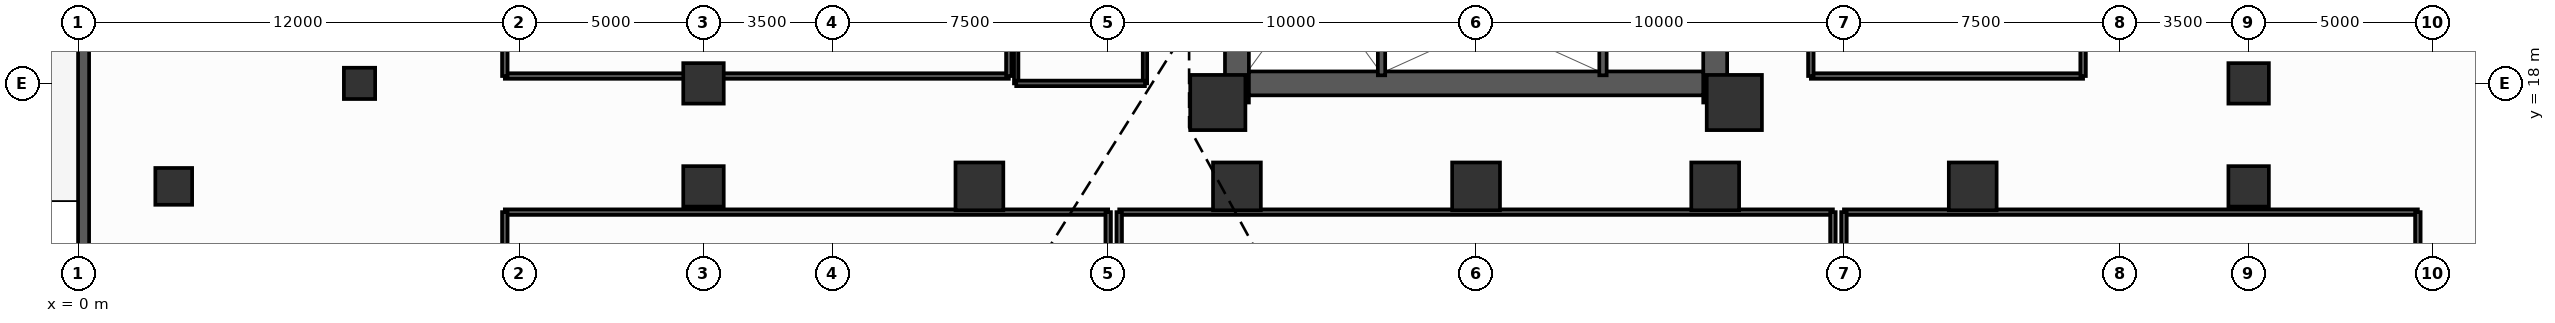
"""IFC4 building model, lengths in metres.
Left out: names, types, materials, properties, quantities, classifications, styles, units other than length and angle.
Written with IfcOpenShell. Run it as: python <this file> out.ifc"""

import sys

from ifc_helpers import new_model, si_unit, direction, frame, frame_2d, origin, origin_2d, place, context, subcontext, project, spatial, rectangle, circle, extrude, source, transform, mapped, element, fill, save


model = new_model("IFC4")
c1 = context("Model", 3, precision=1e-05, world=origin(), true_north=direction((0.0, 1.0)))
c2 = subcontext(c1, "Body", "Model", "MODEL_VIEW")
j1 = project(units=[si_unit("LENGTHUNIT", "METRE"), si_unit("PLANEANGLEUNIT", "RADIAN")], contexts=[c1])
p1 = place(None, origin())
s1 = spatial("IfcSite", under=j1, at=p1, CompositionType="ELEMENT")
p2 = place(p1, origin())
s2 = spatial("IfcBuilding", under=s1, at=p2, CompositionType="ELEMENT")
p3 = place(p2, origin())
s3 = spatial("IfcBuildingStorey", under=s2, at=p3, CompositionType="ELEMENT", Elevation=0.0)
p4 = place(p3, frame((31.5, 17.48, 0.0), z_axis=(0.0, 0.0, 1.0), x_axis=(0.0, 1.0, 0.0)))
e1 = element("IfcWall", 1, at=p4, inside=s3, PredefinedType="SHEAR", context=c2, shape_type="SweptSolid", body=[
    extrude(rectangle(XDim=19.04, YDim=0.65, at=frame_2d((9.52, 0.0))), origin(), (0.0, 0.0, 1.0), 4.2),
])
p5 = place(p4, frame((6.32, 0.0, 0.0)))
e2 = element("IfcOpeningElement", 2, at=p5, cuts=e1, PredefinedType="OPENING", context=c2, shape_type="SweptSolid", body=[
    extrude(rectangle(XDim=1.1, YDim=2.15, at=frame_2d((0.55, 1.075))), frame((0.0, 0.337, 0.0), z_axis=(0.0, -1.0, 0.0), x_axis=(1.0, 0.0, 0.0)), (0.0, 0.0, 1.0), 0.674),
])
p6 = place(p3, frame((44.5, 17.48, 0.0), z_axis=(0.0, 0.0, 1.0), x_axis=(0.0, 1.0, 0.0)))
e3 = element("IfcWall", 3, at=p6, inside=s3, PredefinedType="SHEAR", context=c2, shape_type="SweptSolid", body=[
    extrude(rectangle(XDim=19.04, YDim=0.65, at=frame_2d((9.52, 0.0))), origin(), (0.0, 0.0, 1.0), 4.2),
])
p7 = place(p6, frame((12.67, 0.0, 0.0), z_axis=(0.0, 0.0, 1.0), x_axis=(-1.0, 0.0, 0.0)))
e4 = element("IfcOpeningElement", 4, at=p7, cuts=e3, PredefinedType="OPENING", context=c2, shape_type="SweptSolid", body=[
    extrude(rectangle(XDim=1.1, YDim=2.15, at=frame_2d((0.55, 1.075))), frame((0.0, 0.337, 0.0), z_axis=(0.0, -1.0, 0.0), x_axis=(1.0, 0.0, 0.0)), (0.0, 0.0, 1.0), 0.674),
])
p8 = place(p3, frame((31.825, 18.0, 0.0), z_axis=(0.0, 0.0, 1.0), x_axis=(1.0, 0.0, 0.0)))
e5 = element("IfcWall", 5, at=p8, inside=s3, PredefinedType="SHEAR", context=c2, shape_type="SweptSolid", body=[
    extrude(rectangle(XDim=12.35, YDim=0.65, at=frame_2d((6.175, 0.0))), origin(), (0.0, 0.0, 1.0), 4.2),
])
m1 = source(origin(), c2, "Body", "SweptSolid", [
    extrude(rectangle(XDim=1.5, YDim=1.5, at=origin_2d()), origin(), (0.0, 0.0, 1.0), 4.2),
])
for number, where, z_axis, x_axis in (
    (6, (30.98, 17.48, 0.0), (0.0, 0.0, 1.0), (1.0, 0.0, 0.0)),
    (7, (45.02, 17.48, 0.0), (0.0, 0.0, 1.0), (1.0, 0.0, 0.0)),
):
    element("IfcColumn", number, at=place(p3, frame(where, z_axis=z_axis, x_axis=x_axis)), inside=s3, PredefinedType="COLUMN", context=c2, shape_type="MappedRepresentation", body=[
        mapped(m1, transform((0.0, 0.0, 0.0), scale=1.0)),
    ])
m2 = source(origin(), c2, "Body", "SweptSolid", [
    extrude(circle(Radius=0.5, at=origin_2d()), origin(), (0.0, 0.0, 1.0), 4.2),
])
p9 = place(p3, frame((2.6, 15.2, 0.0), z_axis=(0.0, 0.0, 1.0), x_axis=(1.0, 0.0, 0.0)))
e8 = element("IfcColumn", 8, at=p9, inside=s3, PredefinedType="COLUMN", context=c2, shape_type="MappedRepresentation", body=[
    mapped(m2, transform((0.0, 0.0, 0.0), scale=1.0)),
])
m3 = source(origin(), c2, "Body", "SweptSolid", [
    extrude(circle(Radius=0.425, at=origin_2d()), origin(), (0.0, 0.0, 1.0), 4.2),
])
p10 = place(p3, frame((7.65, 18.0, 0.0), z_axis=(0.0, 0.0, 1.0), x_axis=(1.0, 0.0, 0.0)))
e9 = element("IfcColumn", 9, at=p10, inside=s3, PredefinedType="COLUMN", context=c2, shape_type="MappedRepresentation", body=[
    mapped(m3, transform((0.0, 0.0, 0.0), scale=1.0)),
])
m4 = source(origin(), c2, "Body", "SweptSolid", [
    extrude(rectangle(XDim=1.1, YDim=1.1, at=origin_2d()), origin(), (0.0, 0.0, 1.0), 4.2),
])
for number, where, z_axis, x_axis in (
    (10, (17.0, 15.2, 0.0), (0.0, 0.0, 1.0), (1.0, 0.0, 0.0)),
    (11, (59.0, 15.2, 0.0), (0.0, 0.0, 1.0), (1.0, 0.0, 0.0)),
    (12, (17.0, 18.0, 0.0), (0.0, 0.0, 1.0), (1.0, 0.0, 0.0)),
    (13, (59.0, 18.0, 0.0), (0.0, 0.0, 1.0), (1.0, 0.0, 0.0)),
):
    element("IfcColumn", number, at=place(p3, frame(where, z_axis=z_axis, x_axis=x_axis)), inside=s3, PredefinedType="COLUMN", context=c2, shape_type="MappedRepresentation", body=[
        mapped(m4, transform((0.0, 0.0, 0.0), scale=1.0)),
    ])
m5 = source(origin(), c2, "Body", "SweptSolid", [
    extrude(rectangle(XDim=1.3, YDim=1.3, at=origin_2d()), origin(), (0.0, 0.0, 1.0), 4.2),
])
for number, where, z_axis, x_axis in (
    (14, (24.5, 15.2, 0.0), (0.0, 0.0, 1.0), (1.0, 0.0, 0.0)),
    (15, (31.5, 15.2, 0.0), (0.0, 0.0, 1.0), (1.0, 0.0, 0.0)),
    (16, (38.0, 15.2, 0.0), (0.0, 0.0, 1.0), (1.0, 0.0, 0.0)),
    (17, (44.5, 15.2, 0.0), (0.0, 0.0, 1.0), (1.0, 0.0, 0.0)),
    (18, (51.5, 15.2, 0.0), (0.0, 0.0, 1.0), (1.0, 0.0, 0.0)),
):
    element("IfcColumn", number, at=place(p3, frame(where, z_axis=z_axis, x_axis=x_axis)), inside=s3, PredefinedType="COLUMN", context=c2, shape_type="MappedRepresentation", body=[
        mapped(m5, transform((0.0, 0.0, 0.0), scale=1.0)),
    ])
p11 = place(p3, frame((0.15, 0.0, 0.0), z_axis=(0.0, 0.0, 1.0), x_axis=(0.0, 1.0, 0.0)))
e19 = element("IfcWall", 19, at=p11, inside=s3, PredefinedType="SOLIDWALL", context=c2, shape_type="SweptSolid", body=[
    extrude(rectangle(XDim=54.0, YDim=0.3, at=frame_2d((27.0, 0.0))), origin(), (0.0, 0.0, 1.0), 3.48),
])
p12 = place(p11, frame((10.8, 0.0, 0.0)))
e20 = element("IfcOpeningElement", 20, at=p12, cuts=e19, PredefinedType="OPENING", context=c2, shape_type="SweptSolid", body=[
    extrude(rectangle(XDim=2.4, YDim=2.4, at=frame_2d((1.2, 1.2))), frame((0.0, 0.162, 0.0), z_axis=(0.0, -1.0, 0.0), x_axis=(1.0, 0.0, 0.0)), (0.0, 0.0, 1.0), 0.324),
])
p13 = place(p3, frame((41.45, 18.22, 0.0), z_axis=(0.0, 0.0, 1.0), x_axis=(0.0, 1.0, 0.0)))
e21 = element("IfcWall", 21, at=p13, inside=s3, PredefinedType="PARTITIONING", context=c2, shape_type="SweptSolid", body=[
    extrude(rectangle(XDim=2.96, YDim=0.2, at=frame_2d((1.48, 0.0))), origin(), (0.0, 0.0, 1.0), 3.92),
])
p14 = place(p3, frame((35.43, 18.22, 0.0), z_axis=(0.0, 0.0, 1.0), x_axis=(0.0, 1.0, 0.0)))
e22 = element("IfcWall", 22, at=p14, inside=s3, PredefinedType="SOLIDWALL", context=c2, shape_type="SweptSolid", body=[
    extrude(rectangle(XDim=7.22, YDim=0.2, at=frame_2d((3.61, 0.0))), origin(), (0.0, 0.0, 1.0), 3.92),
])
p15 = place(p14, frame((6.68, 0.0, 0.0), z_axis=(0.0, 0.0, 1.0), x_axis=(-1.0, 0.0, 0.0)))
e23 = element("IfcOpeningElement", 23, at=p15, cuts=e22, PredefinedType="OPENING", context=c2, shape_type="SweptSolid", body=[
    extrude(rectangle(XDim=1.1, YDim=2.15, at=frame_2d((0.55, 1.075))), frame((0.0, 0.112, 0.0), z_axis=(0.0, -1.0, 0.0), x_axis=(1.0, 0.0, 0.0)), (0.0, 0.0, 1.0), 0.224),
])
p16 = place(p3, frame((25.5, 18.0, 0.0), z_axis=(0.0, 0.0, 1.0), x_axis=(0.0, 1.0, 0.0)))
e24 = element("IfcWall", 24, at=p16, inside=s3, PredefinedType="PARTITIONING", context=c2, shape_type="SweptSolid", body=[
    extrude(rectangle(XDim=18.0, YDim=0.12, at=frame_2d((9.0, 0.0))), origin(), (0.0, 0.0, 1.0), 3.92),
])
p17 = place(p3, frame((29.0, 18.0, 0.0), z_axis=(0.0, 0.0, 1.0), x_axis=(0.0, 1.0, 0.0)))
e25 = element("IfcWall", 25, at=p17, inside=s3, PredefinedType="PARTITIONING", context=c2, shape_type="SweptSolid", body=[
    extrude(rectangle(XDim=4.0, YDim=0.12, at=frame_2d((2.0, 0.0))), origin(), (0.0, 0.0, 1.0), 3.92),
])
p18 = place(p17, frame((1.55, 0.0, 0.0)))
e26 = element("IfcOpeningElement", 26, at=p18, cuts=e25, PredefinedType="OPENING", context=c2, shape_type="SweptSolid", body=[
    extrude(rectangle(XDim=0.9, YDim=2.1, at=frame_2d((0.45, 1.05))), frame((0.0, 0.072, 0.0), z_axis=(0.0, -1.0, 0.0), x_axis=(1.0, 0.0, 0.0)), (0.0, 0.0, 1.0), 0.144),
])
p19 = place(p3, frame((25.5, 18.0, 0.0), z_axis=(0.0, 0.0, 1.0), x_axis=(1.0, 0.0, 0.0)))
e27 = element("IfcWall", 27, at=p19, inside=s3, PredefinedType="PARTITIONING", context=c2, shape_type="SweptSolid", body=[
    extrude(rectangle(XDim=3.5, YDim=0.15, at=frame_2d((1.75, 0.0))), origin(), (0.0, 0.0, 1.0), 3.29),
])
p20 = place(p3, frame((47.1, 18.2, 0.0), z_axis=(0.0, 0.0, 1.0), x_axis=(1.0, 0.0, 0.0)))
e28 = element("IfcWall", 28, at=p20, inside=s3, PredefinedType="PARTITIONING", context=c2, shape_type="SweptSolid", body=[
    extrude(rectangle(XDim=7.4, YDim=0.15, at=frame_2d((3.7, 0.0))), origin(), (0.0, 0.0, 1.0), 3.92),
])
p21 = place(p3, frame((47.1, 18.2, 0.0), z_axis=(0.0, 0.0, 1.0), x_axis=(0.0, 1.0, 0.0)))
e29 = element("IfcWall", 29, at=p21, inside=s3, PredefinedType="PARTITIONING", context=c2, shape_type="SweptSolid", body=[
    extrude(rectangle(XDim=6.8, YDim=0.15, at=frame_2d((3.4, 0.0))), origin(), (0.0, 0.0, 1.0), 3.92),
])
p22 = place(p21, frame((2.694, 0.0, 0.0)))
e30 = element("IfcOpeningElement", 30, at=p22, cuts=e29, PredefinedType="OPENING", context=c2, shape_type="SweptSolid", body=[
    extrude(rectangle(XDim=1.1, YDim=2.15, at=frame_2d((0.55, 1.075))), frame((0.0, 0.087, 0.0), z_axis=(0.0, -1.0, 0.0), x_axis=(1.0, 0.0, 0.0)), (0.0, 0.0, 1.0), 0.174),
])
p23 = place(p3, frame((54.5, 18.2, 0.0), z_axis=(0.0, 0.0, 1.0), x_axis=(0.0, 1.0, 0.0)))
e31 = element("IfcWall", 31, at=p23, inside=s3, PredefinedType="PARTITIONING", context=c2, shape_type="SweptSolid", body=[
    extrude(rectangle(XDim=6.8, YDim=0.15, at=frame_2d((3.4, 0.0))), origin(), (0.0, 0.0, 1.0), 3.92),
])
p24 = place(p3, frame((11.6, 14.5, 0.0), z_axis=(0.0, 0.0, 1.0), x_axis=(1.0, 0.0, 0.0)))
e32 = element("IfcWall", 32, at=p24, inside=s3, PredefinedType="PARTITIONING", context=c2, shape_type="SweptSolid", body=[
    extrude(rectangle(XDim=16.4, YDim=0.15, at=frame_2d((8.2, 0.0))), origin(), (0.0, 0.0, 1.0), 3.92),
])
p25 = place(p24, frame((7.24, 0.0, 0.0)))
e33 = element("IfcOpeningElement", 33, at=p25, cuts=e32, PredefinedType="OPENING", context=c2, shape_type="SweptSolid", body=[
    extrude(rectangle(XDim=1.0, YDim=2.1, at=frame_2d((0.5, 1.05))), frame((0.0, 0.087, 0.0), z_axis=(0.0, -1.0, 0.0), x_axis=(1.0, 0.0, 0.0)), (0.0, 0.0, 1.0), 0.174),
])
for number, where, z_axis, x_axis in (
    (34, (11.6, 0.1, 0.0), (0.0, 0.0, 1.0), (0.0, 1.0, 0.0)),
    (35, (28.0, 0.1, 0.0), (0.0, 0.0, 1.0), (0.0, 1.0, 0.0)),
):
    element("IfcWall", number, at=place(p3, frame(where, z_axis=z_axis, x_axis=x_axis)), inside=s3, PredefinedType="PARTITIONING", context=c2, shape_type="SweptSolid", body=[
        extrude(rectangle(XDim=14.4, YDim=0.15, at=frame_2d((7.2, 0.0))), origin(), (0.0, 0.0, 1.0), 3.92),
    ])
p26 = place(p3, frame((28.3, 14.5, 0.0), z_axis=(0.0, 0.0, 1.0), x_axis=(1.0, 0.0, 0.0)))
e36 = element("IfcWall", 36, at=p26, inside=s3, PredefinedType="PARTITIONING", context=c2, shape_type="SweptSolid", body=[
    extrude(rectangle(XDim=19.4, YDim=0.15, at=frame_2d((9.7, 0.0))), origin(), (0.0, 0.0, 1.0), 3.92),
])
p27 = place(p26, frame((6.434, 0.0, 0.0)))
e37 = element("IfcOpeningElement", 37, at=p27, cuts=e36, PredefinedType="OPENING", context=c2, shape_type="SweptSolid", body=[
    extrude(rectangle(XDim=1.0, YDim=2.1, at=frame_2d((0.5, 1.05))), frame((0.0, 0.087, 0.0), z_axis=(0.0, -1.0, 0.0), x_axis=(1.0, 0.0, 0.0)), (0.0, 0.0, 1.0), 0.174),
])
for number, where, z_axis, x_axis in (
    (38, (28.3, 0.1, 0.0), (0.0, 0.0, 1.0), (0.0, 1.0, 0.0)),
    (39, (47.7, 0.1, 0.0), (0.0, 0.0, 1.0), (0.0, 1.0, 0.0)),
):
    element("IfcWall", number, at=place(p3, frame(where, z_axis=z_axis, x_axis=x_axis)), inside=s3, PredefinedType="PARTITIONING", context=c2, shape_type="SweptSolid", body=[
        extrude(rectangle(XDim=14.4, YDim=0.15, at=frame_2d((7.2, 0.0))), origin(), (0.0, 0.0, 1.0), 3.92),
    ])
p28 = place(p3, frame((48.0, 14.5, 0.0), z_axis=(0.0, 0.0, 1.0), x_axis=(1.0, 0.0, 0.0)))
e40 = element("IfcWall", 40, at=p28, inside=s3, PredefinedType="PARTITIONING", context=c2, shape_type="SweptSolid", body=[
    extrude(rectangle(XDim=15.6, YDim=0.15, at=frame_2d((7.8, 0.0))), origin(), (0.0, 0.0, 1.0), 3.92),
])
p29 = place(p28, frame((6.865, 0.0, 0.0)))
e41 = element("IfcOpeningElement", 41, at=p29, cuts=e40, PredefinedType="OPENING", context=c2, shape_type="SweptSolid", body=[
    extrude(rectangle(XDim=1.0, YDim=2.1, at=frame_2d((0.5, 1.05))), frame((0.0, 0.087, 0.0), z_axis=(0.0, -1.0, 0.0), x_axis=(1.0, 0.0, 0.0)), (0.0, 0.0, 1.0), 0.174),
])
for number, where, z_axis, x_axis in (
    (42, (48.0, 0.1, 0.0), (0.0, 0.0, 1.0), (0.0, 1.0, 0.0)),
    (43, (63.6, 0.1, 0.0), (0.0, 0.0, 1.0), (0.0, 1.0, 0.0)),
):
    element("IfcWall", number, at=place(p3, frame(where, z_axis=z_axis, x_axis=x_axis)), inside=s3, PredefinedType="PARTITIONING", context=c2, shape_type="SweptSolid", body=[
        extrude(rectangle(XDim=14.4, YDim=0.15, at=frame_2d((7.2, 0.0))), origin(), (0.0, 0.0, 1.0), 3.92),
    ])
p30 = place(p3, frame((11.6, 18.2, 0.0), z_axis=(0.0, 0.0, 1.0), x_axis=(1.0, 0.0, 0.0)))
e44 = element("IfcWall", 44, at=p30, inside=s3, PredefinedType="PARTITIONING", context=c2, shape_type="SweptSolid", body=[
    extrude(rectangle(XDim=13.7, YDim=0.15, at=frame_2d((6.85, 0.0))), origin(), (0.0, 0.0, 1.0), 3.92),
])
p31 = place(p3, frame((11.6, 18.2, 0.0), z_axis=(0.0, 0.0, 1.0), x_axis=(0.0, 1.0, 0.0)))
e45 = element("IfcWall", 45, at=p31, inside=s3, PredefinedType="PARTITIONING", context=c2, shape_type="SweptSolid", body=[
    extrude(rectangle(XDim=8.6, YDim=0.15, at=frame_2d((4.3, 0.0))), origin(), (0.0, 0.0, 1.0), 3.92),
])
p32 = place(p31, frame((3.584, 0.0, 0.0)))
e46 = element("IfcOpeningElement", 46, at=p32, cuts=e45, PredefinedType="OPENING", context=c2, shape_type="SweptSolid", body=[
    extrude(rectangle(XDim=1.0, YDim=2.1, at=frame_2d((0.5, 1.05))), frame((0.0, 0.087, 0.0), z_axis=(0.0, -1.0, 0.0), x_axis=(1.0, 0.0, 0.0)), (0.0, 0.0, 1.0), 0.174),
])
p33 = place(p3, frame((25.3, 18.2, 0.0), z_axis=(0.0, 0.0, 1.0), x_axis=(0.0, 1.0, 0.0)))
e47 = element("IfcWall", 47, at=p33, inside=s3, PredefinedType="PARTITIONING", context=c2, shape_type="SweptSolid", body=[
    extrude(rectangle(XDim=8.6, YDim=0.15, at=frame_2d((4.3, 0.0))), origin(), (0.0, 0.0, 1.0), 3.92),
])
m6 = source(origin(), c2, "Body", "SweptSolid", [
    extrude(rectangle(XDim=1.0, YDim=2.1, at=frame_2d((0.5, 1.05))), frame((0.0, 0.025, 0.0), z_axis=(0.0, -1.0, 0.0), x_axis=(1.0, 0.0, 0.0)), (0.0, 0.0, 1.0), 0.05),
])
p34 = place(p25, origin())
e48 = element("IfcDoor", 48, at=p34, inside=s3, OperationType="SINGLE_SWING_RIGHT", PredefinedType="DOOR", context=c2, shape_type="MappedRepresentation", body=[
    mapped(m6, transform((0.0, 0.0, 0.0), scale=1.0)),
])
fill(e33, e48)
p35 = place(p27, origin())
e49 = element("IfcDoor", 49, at=p35, inside=s3, OperationType="SINGLE_SWING_LEFT", PredefinedType="DOOR", context=c2, shape_type="MappedRepresentation", body=[
    mapped(m6, transform((0.0, 0.0, 0.0), scale=1.0)),
])
fill(e37, e49)
p36 = place(p29, origin())
e50 = element("IfcDoor", 50, at=p36, inside=s3, OperationType="SINGLE_SWING_LEFT", PredefinedType="DOOR", context=c2, shape_type="MappedRepresentation", body=[
    mapped(m6, transform((0.0, 0.0, 0.0), scale=1.0)),
])
fill(e41, e50)
save(model, sys.argv[1])
